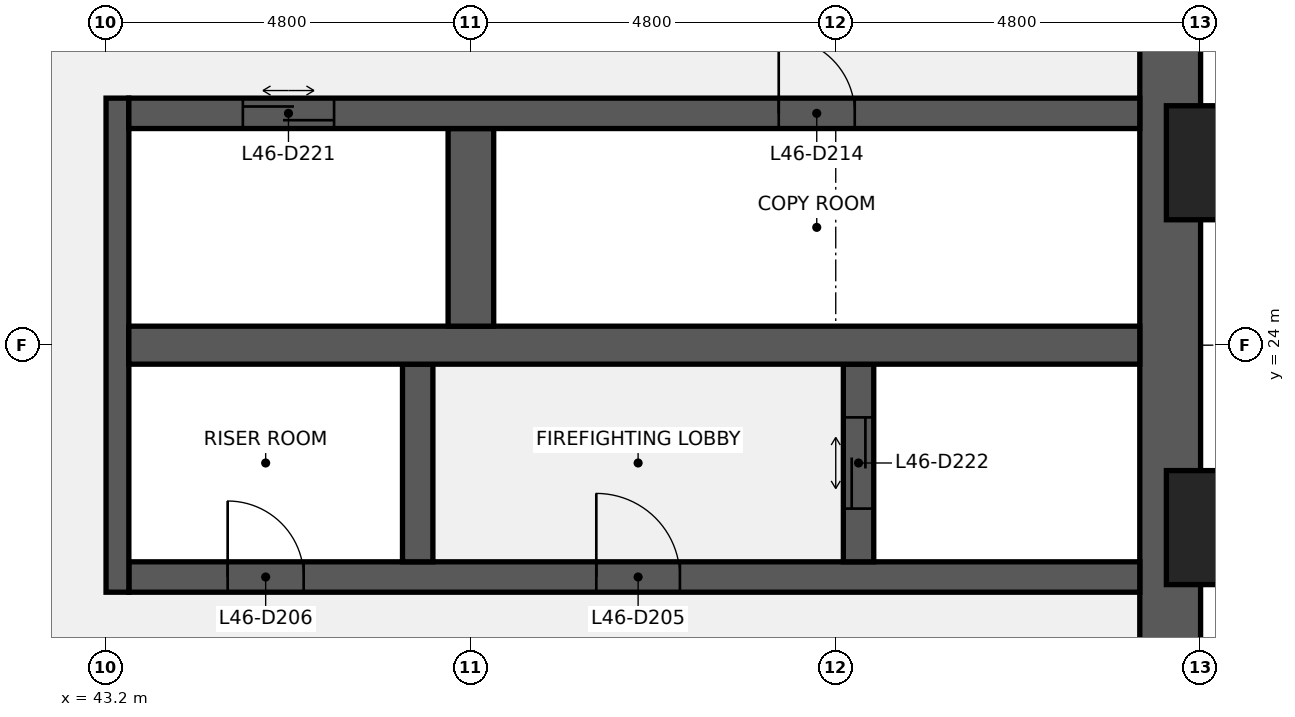
"""IFC4 building model, lengths in metres.
Left out: names, types, materials, properties, quantities, classifications, styles, units other than length and angle.
Written with IfcOpenShell. Run it as: python <this file> out.ifc"""

import sys

from ifc_helpers import new_model, si_unit, direction, frame, frame_2d, origin, origin_2d, place, context, subcontext, project, spatial, rectangle, extrude, element, fill, save


model = new_model("IFC4")
c1 = context("Model", 3, precision=1e-05, world=origin(), true_north=direction((0.0, 1.0)))
c2 = subcontext(c1, "Body", "Model", "MODEL_VIEW")
j1 = project(units=[si_unit("LENGTHUNIT", "METRE"), si_unit("PLANEANGLEUNIT", "RADIAN")], contexts=[c1])
p1 = place(None, origin())
s1 = spatial("IfcSite", under=j1, at=p1, CompositionType="ELEMENT")
p2 = place(p1, origin())
s2 = spatial("IfcBuilding", under=s1, at=p2, CompositionType="ELEMENT")
p3 = place(p2, frame((0.0, 0.0, 213.2)))
s3 = spatial("IfcBuildingStorey", under=s2, at=p3, CompositionType="ELEMENT", Elevation=213.2)
p4 = place(p3, frame((57.2, 38.4, 0.0), z_axis=(0.0, 0.0, 1.0), x_axis=(0.0, -1.0, 0.0)))
e1 = element("IfcWall", 1, at=p4, inside=s3, PredefinedType="SHEAR", context=c2, shape_type="SweptSolid", body=[
    extrude(rectangle(XDim=28.8, YDim=0.8, at=frame_2d((14.4, 0.0))), origin(), (0.0, 0.0, 1.0), 3.84),
])
p5 = place(p4, frame((18.45, 0.0, 0.9)))
e2 = element("IfcOpeningElement", 2, at=p5, cuts=e1, PredefinedType="OPENING", context=c2, shape_type="SweptSolid", body=[
    extrude(rectangle(XDim=1.5, YDim=1.5, at=frame_2d((0.75, 0.75))), frame((0.0, 0.41, 0.0), z_axis=(0.0, -1.0, 0.0), x_axis=(1.0, 0.0, 0.0)), (0.0, 0.0, 1.0), 0.82),
])
p6 = place(p4, frame((8.85, 0.0, 0.9)))
e3 = element("IfcOpeningElement", 3, at=p6, cuts=e1, PredefinedType="OPENING", context=c2, shape_type="SweptSolid", body=[
    extrude(rectangle(XDim=1.5, YDim=1.5, at=frame_2d((0.75, 0.75))), frame((0.0, 0.41, 0.0), z_axis=(0.0, -1.0, 0.0), x_axis=(1.0, 0.0, 0.0)), (0.0, 0.0, 1.0), 0.82),
])
p7 = place(p3, frame((43.5, 20.95, 0.0), z_axis=(0.0, 0.0, 1.0), x_axis=(1.0, 0.0, 0.0)))
e4 = element("IfcWall", 4, at=p7, inside=s3, PredefinedType="SHEAR", context=c2, shape_type="SweptSolid", body=[
    extrude(rectangle(XDim=13.3, YDim=0.4, at=frame_2d((6.65, 0.0))), origin(), (0.0, 0.0, 1.0), 3.84),
])
p8 = place(p7, frame((6.15, 0.0, 0.0)))
e5 = element("IfcOpeningElement", 5, at=p8, cuts=e4, PredefinedType="OPENING", context=c2, shape_type="SweptSolid", body=[
    extrude(rectangle(XDim=1.1, YDim=2.1, at=frame_2d((0.55, 1.05))), frame((0.0, 0.21, 0.0), z_axis=(0.0, -1.0, 0.0), x_axis=(1.0, 0.0, 0.0)), (0.0, 0.0, 1.0), 0.42),
])
p9 = place(p7, frame((1.3, 0.0, 0.0)))
e6 = element("IfcOpeningElement", 6, at=p9, cuts=e4, PredefinedType="OPENING", context=c2, shape_type="SweptSolid", body=[
    extrude(rectangle(XDim=1.0, YDim=2.1, at=frame_2d((0.5, 1.05))), frame((0.0, 0.21, 0.0), z_axis=(0.0, -1.0, 0.0), x_axis=(1.0, 0.0, 0.0)), (0.0, 0.0, 1.0), 0.42),
])
p10 = place(p3, frame((43.35, 20.75, 0.0), z_axis=(0.0, 0.0, 1.0), x_axis=(0.0, 1.0, 0.0)))
e7 = element("IfcWall", 7, at=p10, inside=s3, PredefinedType="SHEAR", context=c2, shape_type="SweptSolid", body=[
    extrude(rectangle(XDim=6.5, YDim=0.3, at=frame_2d((3.25, 0.0))), origin(), (0.0, 0.0, 1.0), 3.84),
])
p11 = place(p3, frame((53.1, 21.15, 0.0), z_axis=(0.0, 0.0, 1.0), x_axis=(0.0, 1.0, 0.0)))
e8 = element("IfcWall", 8, at=p11, inside=s3, PredefinedType="SHEAR", context=c2, shape_type="SweptSolid", body=[
    extrude(rectangle(XDim=2.6, YDim=0.4, at=frame_2d((1.3, 0.0))), origin(), (0.0, 0.0, 1.0), 3.84),
])
p12 = place(p11, frame((0.7, 0.0, 0.0)))
e9 = element("IfcOpeningElement", 9, at=p12, cuts=e8, PredefinedType="OPENING", context=c2, shape_type="SweptSolid", body=[
    extrude(rectangle(XDim=1.2, YDim=2.1, at=frame_2d((0.6, 1.05))), frame((0.0, 0.21, 0.0), z_axis=(0.0, -1.0, 0.0), x_axis=(1.0, 0.0, 0.0)), (0.0, 0.0, 1.0), 0.42),
])
p13 = place(p3, frame((47.3, 21.15, 0.0), z_axis=(0.0, 0.0, 1.0), x_axis=(0.0, 1.0, 0.0)))
e10 = element("IfcWall", 10, at=p13, inside=s3, PredefinedType="SHEAR", context=c2, shape_type="SweptSolid", body=[
    extrude(rectangle(XDim=2.6, YDim=0.4, at=frame_2d((1.3, 0.0))), origin(), (0.0, 0.0, 1.0), 3.84),
])
p14 = place(p3, frame((43.5, 24.0, 0.0), z_axis=(0.0, 0.0, 1.0), x_axis=(1.0, 0.0, 0.0)))
e11 = element("IfcWall", 11, at=p14, inside=s3, PredefinedType="SHEAR", context=c2, shape_type="SweptSolid", body=[
    extrude(rectangle(XDim=13.3, YDim=0.5, at=frame_2d((6.65, 0.0))), origin(), (0.0, 0.0, 1.0), 3.84),
])
p15 = place(p3, frame((48.0, 24.25, 0.0), z_axis=(0.0, 0.0, 1.0), x_axis=(0.0, 1.0, 0.0)))
e12 = element("IfcWall", 12, at=p15, inside=s3, PredefinedType="SHEAR", context=c2, shape_type="SweptSolid", body=[
    extrude(rectangle(XDim=2.6, YDim=0.6, at=frame_2d((1.3, 0.0))), origin(), (0.0, 0.0, 1.0), 3.84),
])
p16 = place(p3, frame((43.5, 27.05, 0.0), z_axis=(0.0, 0.0, 1.0), x_axis=(1.0, 0.0, 0.0)))
e13 = element("IfcWall", 13, at=p16, inside=s3, PredefinedType="SHEAR", context=c2, shape_type="SweptSolid", body=[
    extrude(rectangle(XDim=13.3, YDim=0.4, at=frame_2d((6.65, 0.0))), origin(), (0.0, 0.0, 1.0), 3.84),
])
p17 = place(p16, frame((8.55, 0.0, 0.0)))
e14 = element("IfcOpeningElement", 14, at=p17, cuts=e13, PredefinedType="OPENING", context=c2, shape_type="SweptSolid", body=[
    extrude(rectangle(XDim=1.0, YDim=2.1, at=frame_2d((0.5, 1.05))), frame((0.0, 0.21, 0.0), z_axis=(0.0, -1.0, 0.0), x_axis=(1.0, 0.0, 0.0)), (0.0, 0.0, 1.0), 0.42),
])
p18 = place(p16, frame((1.5, 0.0, 0.0)))
e15 = element("IfcOpeningElement", 15, at=p18, cuts=e13, PredefinedType="OPENING", context=c2, shape_type="SweptSolid", body=[
    extrude(rectangle(XDim=1.2, YDim=2.1, at=frame_2d((0.6, 1.05))), frame((0.0, 0.21, 0.0), z_axis=(0.0, -1.0, 0.0), x_axis=(1.0, 0.0, 0.0)), (0.0, 0.0, 1.0), 0.42),
])
for number, where, z_axis, x_axis in (
    (16, (58.35, 21.6, 0.0), (0.0, 0.0, 1.0), (0.0, 1.0, 0.0)),
    (17, (58.35, 26.4, 0.0), (0.0, 0.0, 1.0), (0.0, 1.0, 0.0)),
):
    element("IfcColumn", number, at=place(p3, frame(where, z_axis=z_axis, x_axis=x_axis)), inside=s3, PredefinedType="PILASTER", context=c2, shape_type="SweptSolid", body=[
        extrude(rectangle(XDim=2.4, YDim=1.5, at=origin_2d()), origin(), (0.0, 0.0, 1.0), 4.0),
    ])
p19 = place(p8, origin())
e18 = element("IfcDoor", 18, at=p19, inside=s3, OperationType="SINGLE_SWING_LEFT", PredefinedType="DOOR", context=c2, shape_type="SweptSolid", body=[
    extrude(rectangle(XDim=1.1, YDim=2.1, at=frame_2d((0.55, 1.05))), frame((0.0, 0.025, 0.0), z_axis=(0.0, -1.0, 0.0), x_axis=(1.0, 0.0, 0.0)), (0.0, 0.0, 1.0), 0.05),
])
fill(e5, e18)
p20 = place(p9, origin())
e19 = element("IfcDoor", 19, at=p20, inside=s3, OperationType="SINGLE_SWING_LEFT", PredefinedType="DOOR", context=c2, shape_type="SweptSolid", body=[
    extrude(rectangle(XDim=1.0, YDim=2.1, at=frame_2d((0.5, 1.05))), frame((0.0, 0.025, 0.0), z_axis=(0.0, -1.0, 0.0), x_axis=(1.0, 0.0, 0.0)), (0.0, 0.0, 1.0), 0.05),
])
fill(e6, e19)
p21 = place(p17, origin())
e20 = element("IfcDoor", 20, at=p21, inside=s3, OperationType="SINGLE_SWING_LEFT", PredefinedType="DOOR", context=c2, shape_type="SweptSolid", body=[
    extrude(rectangle(XDim=1.0, YDim=2.1, at=frame_2d((0.5, 1.05))), frame((0.0, 0.025, 0.0), z_axis=(0.0, -1.0, 0.0), x_axis=(1.0, 0.0, 0.0)), (0.0, 0.0, 1.0), 0.05),
])
fill(e14, e20)
p22 = place(p18, origin())
e21 = element("IfcDoor", 21, at=p22, inside=s3, OperationType="DOUBLE_DOOR_SLIDING", PredefinedType="DOOR", context=c2, shape_type="SweptSolid", body=[
    extrude(rectangle(XDim=1.2, YDim=2.1, at=frame_2d((0.6, 1.05))), frame((0.0, 0.025, 0.0), z_axis=(0.0, -1.0, 0.0), x_axis=(1.0, 0.0, 0.0)), (0.0, 0.0, 1.0), 0.05),
])
fill(e15, e21)
p23 = place(p12, origin())
e22 = element("IfcDoor", 22, at=p23, inside=s3, OperationType="DOUBLE_DOOR_SLIDING", PredefinedType="DOOR", context=c2, shape_type="SweptSolid", body=[
    extrude(rectangle(XDim=1.2, YDim=2.1, at=frame_2d((0.6, 1.05))), frame((0.0, 0.025, 0.0), z_axis=(0.0, -1.0, 0.0), x_axis=(1.0, 0.0, 0.0)), (0.0, 0.0, 1.0), 0.05),
])
fill(e9, e22)
save(model, sys.argv[1])
